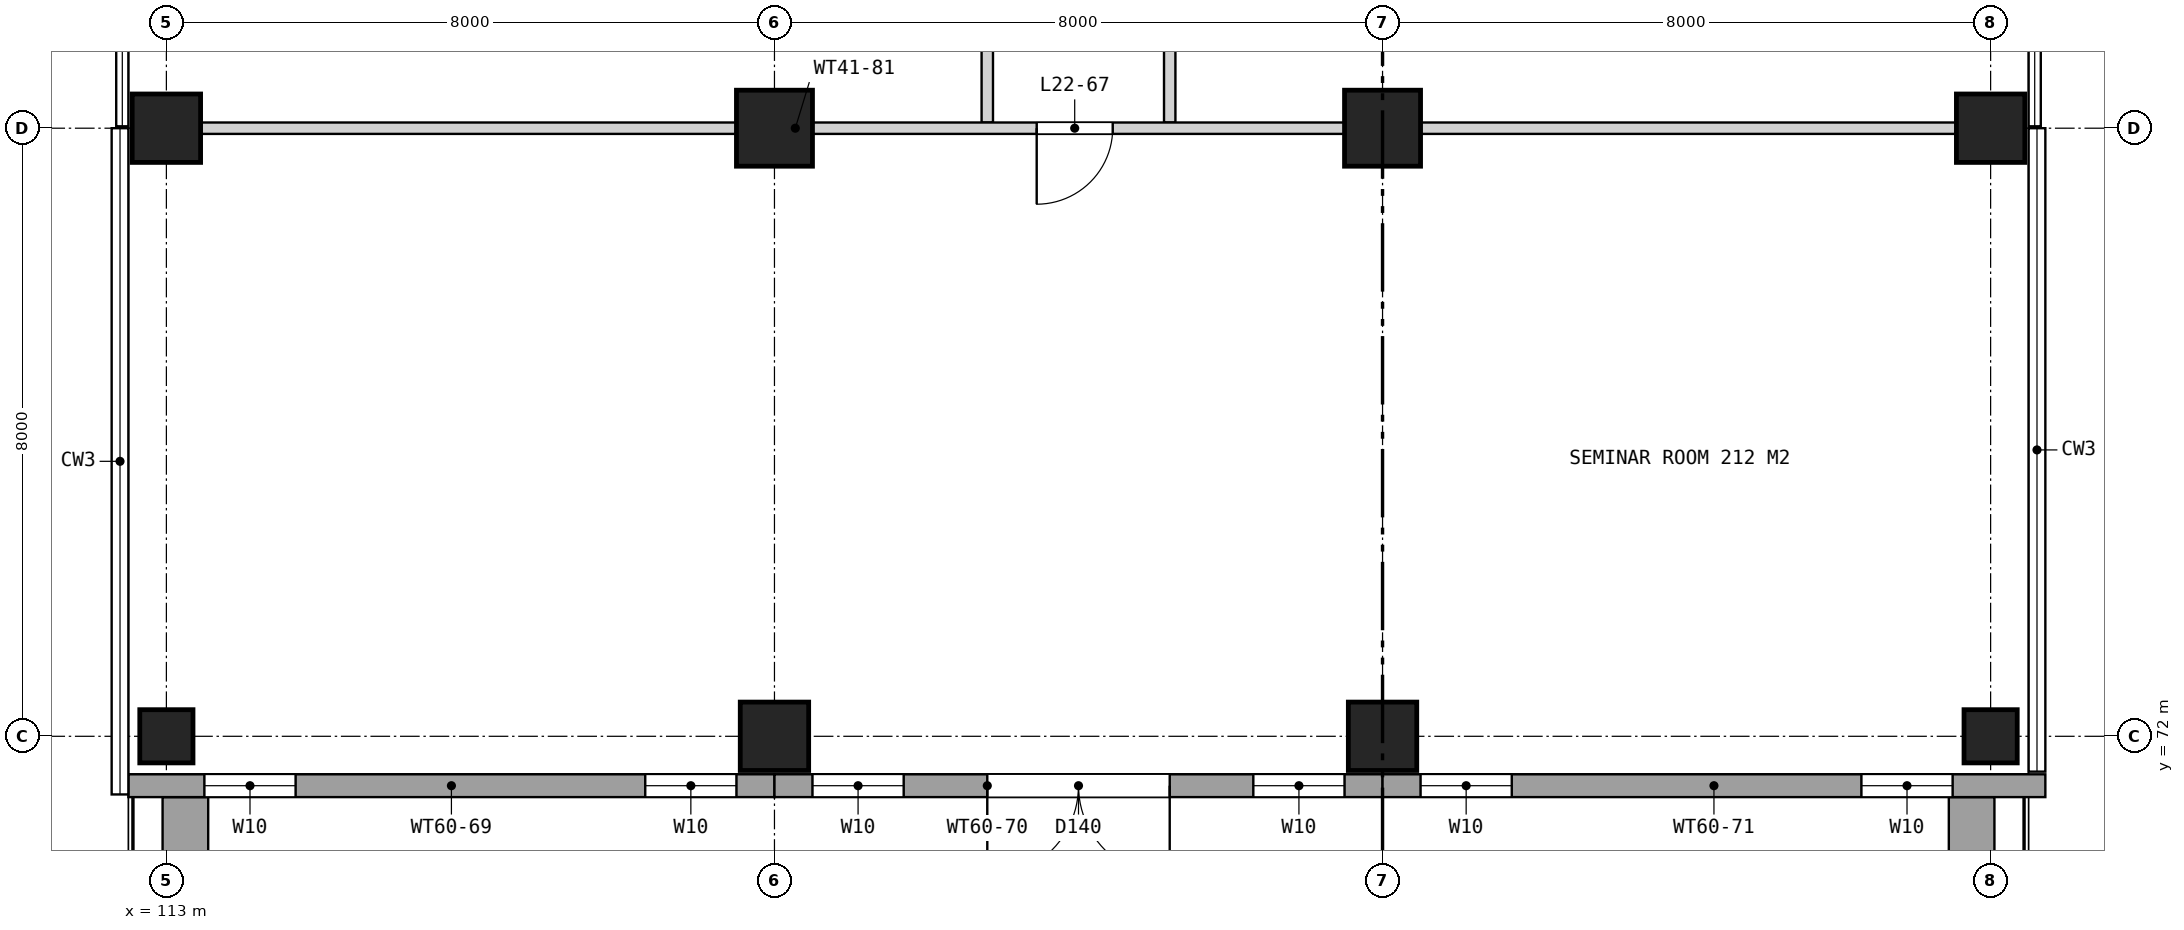
"""IFC4 building model, lengths in metres.
Left out: names, types, materials, properties, quantities, classifications, styles, units other than length and angle.
Written with IfcOpenShell. Run it as: python <this file> out.ifc"""

import sys

from ifc_helpers import new_model, si_unit, direction, frame, frame_2d, origin, origin_2d, place, context, subcontext, project, spatial, rectangle, extrude, element, fill, save


model = new_model("IFC4")
c1 = context("Model", 3, precision=1e-05, world=origin(), true_north=direction((0.0, 1.0)))
c2 = subcontext(c1, "Body", "Model", "MODEL_VIEW")
j1 = project(units=[si_unit("LENGTHUNIT", "METRE"), si_unit("PLANEANGLEUNIT", "RADIAN")], contexts=[c1])
p1 = place(None, origin())
s1 = spatial("IfcSite", under=j1, at=p1, CompositionType="ELEMENT")
p2 = place(p1, origin())
s2 = spatial("IfcBuilding", under=s1, at=p2, CompositionType="ELEMENT")
p3 = place(p2, frame((0.0, 0.0, 112.7)))
s3 = spatial("IfcBuildingStorey", under=s2, at=p3, CompositionType="ELEMENT", Elevation=112.7)
p4 = place(p3, frame((113.0, 72.0, 0.0), z_axis=(0.0, 0.0, 1.0), x_axis=(1.0, 0.0, 0.0)))
e1 = element("IfcColumn", 1, at=p4, inside=s3, PredefinedType="COLUMN", context=c2, shape_type="SweptSolid", body=[
    extrude(rectangle(XDim=0.7, YDim=0.7, at=origin_2d()), origin(), (0.0, 0.0, 1.0), 4.2),
])
for number, where, z_axis, x_axis in (
    (2, (113.0, 80.0, 0.0), (0.0, 0.0, 1.0), (1.0, 0.0, 0.0)),
    (3, (121.0, 72.0, 0.0), (0.0, 0.0, 1.0), (1.0, 0.0, 0.0)),
):
    element("IfcColumn", number, at=place(p3, frame(where, z_axis=z_axis, x_axis=x_axis)), inside=s3, PredefinedType="COLUMN", context=c2, shape_type="SweptSolid", body=[
        extrude(rectangle(XDim=0.9, YDim=0.9, at=origin_2d()), origin(), (0.0, 0.0, 1.0), 4.2),
    ])
p5 = place(p3, frame((121.0, 80.0, 0.0), z_axis=(0.0, 0.0, 1.0), x_axis=(1.0, 0.0, 0.0)))
e4 = element("IfcColumn", 4, at=p5, inside=s3, PredefinedType="COLUMN", context=c2, shape_type="SweptSolid", body=[
    extrude(rectangle(XDim=1.0, YDim=1.0, at=origin_2d()), origin(), (0.0, 0.0, 1.0), 4.2),
])
p6 = place(p3, frame((129.0, 72.0, 0.0), z_axis=(0.0, 0.0, 1.0), x_axis=(1.0, 0.0, 0.0)))
e5 = element("IfcColumn", 5, at=p6, inside=s3, PredefinedType="COLUMN", context=c2, shape_type="SweptSolid", body=[
    extrude(rectangle(XDim=0.9, YDim=0.9, at=origin_2d()), origin(), (0.0, 0.0, 1.0), 4.2),
])
p7 = place(p3, frame((129.0, 80.0, 0.0), z_axis=(0.0, 0.0, 1.0), x_axis=(1.0, 0.0, 0.0)))
e6 = element("IfcColumn", 6, at=p7, inside=s3, PredefinedType="COLUMN", context=c2, shape_type="SweptSolid", body=[
    extrude(rectangle(XDim=1.0, YDim=1.0, at=origin_2d()), origin(), (0.0, 0.0, 1.0), 4.2),
])
p8 = place(p3, frame((137.0, 72.0, 0.0), z_axis=(0.0, 0.0, 1.0), x_axis=(1.0, 0.0, 0.0)))
e7 = element("IfcColumn", 7, at=p8, inside=s3, PredefinedType="COLUMN", context=c2, shape_type="SweptSolid", body=[
    extrude(rectangle(XDim=0.7, YDim=0.7, at=origin_2d()), origin(), (0.0, 0.0, 1.0), 4.2),
])
p9 = place(p3, frame((137.0, 80.0, 0.0), z_axis=(0.0, 0.0, 1.0), x_axis=(1.0, 0.0, 0.0)))
e8 = element("IfcColumn", 8, at=p9, inside=s3, PredefinedType="COLUMN", context=c2, shape_type="SweptSolid", body=[
    extrude(rectangle(XDim=0.9, YDim=0.9, at=origin_2d()), origin(), (0.0, 0.0, 1.0), 4.2),
])
p10 = place(p3, frame((136.75, 71.2, 0.0), z_axis=(0.0, 0.0, 1.0), x_axis=(0.0, -1.0, 0.0)))
e9 = element("IfcWall", 9, at=p10, inside=s3, PredefinedType="SOLIDWALL", context=c2, shape_type="SweptSolid", body=[
    extrude(rectangle(XDim=7.25, YDim=0.6, at=frame_2d((3.625, 0.0))), origin(), (0.0, 0.0, 1.0), 0.6),
])
p11 = place(p3, frame((113.25, 64.55, 0.0), z_axis=(0.0, 0.0, 1.0), x_axis=(0.0, 1.0, 0.0)))
e10 = element("IfcWall", 10, at=p11, inside=s3, PredefinedType="SOLIDWALL", context=c2, shape_type="SweptSolid", body=[
    extrude(rectangle(XDim=6.65, YDim=0.6, at=frame_2d((3.325, 0.0))), origin(), (0.0, 0.0, 1.0), 0.6),
])
p12 = place(p3, frame((112.5, 71.35, 0.0), z_axis=(0.0, 0.0, 1.0), x_axis=(1.0, 0.0, 0.0)))
e11 = element("IfcWall", 11, at=p12, inside=s3, PredefinedType="SOLIDWALL", context=c2, shape_type="SweptSolid", body=[
    extrude(rectangle(XDim=8.5, YDim=0.3, at=frame_2d((4.25, 0.0))), origin(), (0.0, 0.0, 1.0), 3.447),
])
p13 = place(p12, frame((1.0, 0.0, 0.4)))
e12 = element("IfcOpeningElement", 12, at=p13, cuts=e11, PredefinedType="OPENING", context=c2, shape_type="SweptSolid", body=[
    extrude(rectangle(XDim=1.2, YDim=2.2, at=frame_2d((0.6, 1.1))), frame((0.0, 0.16, 0.0), z_axis=(0.0, -1.0, 0.0), x_axis=(1.0, 0.0, 0.0)), (0.0, 0.0, 1.0), 0.32),
])
p14 = place(p12, frame((6.8, 0.0, 0.4)))
e13 = element("IfcOpeningElement", 13, at=p14, cuts=e11, PredefinedType="OPENING", context=c2, shape_type="SweptSolid", body=[
    extrude(rectangle(XDim=1.2, YDim=2.2, at=frame_2d((0.6, 1.1))), frame((0.0, 0.16, 0.0), z_axis=(0.0, -1.0, 0.0), x_axis=(1.0, 0.0, 0.0)), (0.0, 0.0, 1.0), 0.32),
])
p15 = place(p3, frame((121.0, 71.35, 0.0), z_axis=(0.0, 0.0, 1.0), x_axis=(1.0, 0.0, 0.0)))
e14 = element("IfcWall", 14, at=p15, inside=s3, PredefinedType="SOLIDWALL", context=c2, shape_type="SweptSolid", body=[
    extrude(rectangle(XDim=8.0, YDim=0.3, at=frame_2d((4.0, 0.0))), origin(), (0.0, 0.0, 1.0), 3.447),
])
p16 = place(p15, frame((2.8, 0.0, 0.0)))
e15 = element("IfcOpeningElement", 15, at=p16, cuts=e14, PredefinedType="OPENING", context=c2, shape_type="SweptSolid", body=[
    extrude(rectangle(XDim=2.4, YDim=2.4, at=frame_2d((1.2, 1.2))), frame((0.0, 0.16, 0.0), z_axis=(0.0, -1.0, 0.0), x_axis=(1.0, 0.0, 0.0)), (0.0, 0.0, 1.0), 0.32),
])
p17 = place(p15, frame((0.5, 0.0, 0.4)))
e16 = element("IfcOpeningElement", 16, at=p17, cuts=e14, PredefinedType="OPENING", context=c2, shape_type="SweptSolid", body=[
    extrude(rectangle(XDim=1.2, YDim=2.2, at=frame_2d((0.6, 1.1))), frame((0.0, 0.16, 0.0), z_axis=(0.0, -1.0, 0.0), x_axis=(1.0, 0.0, 0.0)), (0.0, 0.0, 1.0), 0.32),
])
p18 = place(p15, frame((6.3, 0.0, 0.4)))
e17 = element("IfcOpeningElement", 17, at=p18, cuts=e14, PredefinedType="OPENING", context=c2, shape_type="SweptSolid", body=[
    extrude(rectangle(XDim=1.2, YDim=2.2, at=frame_2d((0.6, 1.1))), frame((0.0, 0.16, 0.0), z_axis=(0.0, -1.0, 0.0), x_axis=(1.0, 0.0, 0.0)), (0.0, 0.0, 1.0), 0.32),
])
p19 = place(p3, frame((129.0, 71.35, 0.0), z_axis=(0.0, 0.0, 1.0), x_axis=(1.0, 0.0, 0.0)))
e18 = element("IfcWall", 18, at=p19, inside=s3, PredefinedType="SOLIDWALL", context=c2, shape_type="SweptSolid", body=[
    extrude(rectangle(XDim=8.72, YDim=0.3, at=frame_2d((4.36, 0.0))), origin(), (0.0, 0.0, 1.0), 3.447),
])
p20 = place(p19, frame((0.5, 0.0, 0.4)))
e19 = element("IfcOpeningElement", 19, at=p20, cuts=e18, PredefinedType="OPENING", context=c2, shape_type="SweptSolid", body=[
    extrude(rectangle(XDim=1.2, YDim=2.2, at=frame_2d((0.6, 1.1))), frame((0.0, 0.16, 0.0), z_axis=(0.0, -1.0, 0.0), x_axis=(1.0, 0.0, 0.0)), (0.0, 0.0, 1.0), 0.32),
])
p21 = place(p19, frame((6.3, 0.0, 0.4)))
e20 = element("IfcOpeningElement", 20, at=p21, cuts=e18, PredefinedType="OPENING", context=c2, shape_type="SweptSolid", body=[
    extrude(rectangle(XDim=1.2, YDim=2.2, at=frame_2d((0.6, 1.1))), frame((0.0, 0.16, 0.0), z_axis=(0.0, -1.0, 0.0), x_axis=(1.0, 0.0, 0.0)), (0.0, 0.0, 1.0), 0.32),
])
p22 = place(p3, frame((123.8, 80.075, 0.0), z_axis=(0.0, 0.0, 1.0), x_axis=(0.0, 1.0, 0.0)))
e21 = element("IfcWall", 21, at=p22, inside=s3, PredefinedType="PARTITIONING", context=c2, shape_type="SweptSolid", body=[
    extrude(rectangle(XDim=18.725, YDim=0.15, at=frame_2d((9.363, 0.0))), origin(), (0.0, 0.0, 1.0), 3.437),
])
p23 = place(p22, frame((16.975, 0.0, 0.0)))
e22 = element("IfcOpeningElement", 22, at=p23, cuts=e21, PredefinedType="OPENING", context=c2, shape_type="SweptSolid", body=[
    extrude(rectangle(XDim=1.0, YDim=2.1, at=frame_2d((0.5, 1.05))), frame((0.0, 0.085, 0.0), z_axis=(0.0, -1.0, 0.0), x_axis=(1.0, 0.0, 0.0)), (0.0, 0.0, 1.0), 0.17),
])
p24 = place(p22, frame((14.575, 0.0, 0.0)))
e23 = element("IfcOpeningElement", 23, at=p24, cuts=e21, PredefinedType="OPENING", context=c2, shape_type="SweptSolid", body=[
    extrude(rectangle(XDim=1.0, YDim=2.1, at=frame_2d((0.5, 1.05))), frame((0.0, 0.085, 0.0), z_axis=(0.0, -1.0, 0.0), x_axis=(1.0, 0.0, 0.0)), (0.0, 0.0, 1.0), 0.17),
])
p25 = place(p22, frame((10.375, 0.0, 0.0)))
e24 = element("IfcOpeningElement", 24, at=p25, cuts=e21, PredefinedType="OPENING", context=c2, shape_type="SweptSolid", body=[
    extrude(rectangle(XDim=1.0, YDim=2.1, at=frame_2d((0.5, 1.05))), frame((0.0, 0.085, 0.0), z_axis=(0.0, -1.0, 0.0), x_axis=(1.0, 0.0, 0.0)), (0.0, 0.0, 1.0), 0.17),
])
p26 = place(p22, frame((3.45, 0.0, 0.0)))
e25 = element("IfcOpeningElement", 25, at=p26, cuts=e21, PredefinedType="OPENING", context=c2, shape_type="SweptSolid", body=[
    extrude(rectangle(XDim=1.0, YDim=2.1, at=frame_2d((0.5, 1.05))), frame((0.0, 0.085, 0.0), z_axis=(0.0, -1.0, 0.0), x_axis=(1.0, 0.0, 0.0)), (0.0, 0.0, 1.0), 0.17),
])
p27 = place(p3, frame((126.2, 80.075, 0.0), z_axis=(0.0, 0.0, 1.0), x_axis=(0.0, 1.0, 0.0)))
e26 = element("IfcWall", 26, at=p27, inside=s3, PredefinedType="PARTITIONING", context=c2, shape_type="SweptSolid", body=[
    extrude(rectangle(XDim=18.725, YDim=0.15, at=frame_2d((9.363, 0.0))), origin(), (0.0, 0.0, 1.0), 3.437),
])
p28 = place(p27, frame((16.975, 0.0, 0.0)))
e27 = element("IfcOpeningElement", 27, at=p28, cuts=e26, PredefinedType="OPENING", context=c2, shape_type="SweptSolid", body=[
    extrude(rectangle(XDim=1.0, YDim=2.1, at=frame_2d((0.5, 1.05))), frame((0.0, 0.085, 0.0), z_axis=(0.0, -1.0, 0.0), x_axis=(1.0, 0.0, 0.0)), (0.0, 0.0, 1.0), 0.17),
])
p29 = place(p27, frame((14.575, 0.0, 0.0)))
e28 = element("IfcOpeningElement", 28, at=p29, cuts=e26, PredefinedType="OPENING", context=c2, shape_type="SweptSolid", body=[
    extrude(rectangle(XDim=1.0, YDim=2.1, at=frame_2d((0.5, 1.05))), frame((0.0, 0.085, 0.0), z_axis=(0.0, -1.0, 0.0), x_axis=(1.0, 0.0, 0.0)), (0.0, 0.0, 1.0), 0.17),
])
p30 = place(p27, frame((10.375, 0.0, 0.0)))
e29 = element("IfcOpeningElement", 29, at=p30, cuts=e26, PredefinedType="OPENING", context=c2, shape_type="SweptSolid", body=[
    extrude(rectangle(XDim=1.0, YDim=2.1, at=frame_2d((0.5, 1.05))), frame((0.0, 0.085, 0.0), z_axis=(0.0, -1.0, 0.0), x_axis=(1.0, 0.0, 0.0)), (0.0, 0.0, 1.0), 0.17),
])
p31 = place(p27, frame((3.45, 0.0, 0.0)))
e30 = element("IfcOpeningElement", 30, at=p31, cuts=e26, PredefinedType="OPENING", context=c2, shape_type="SweptSolid", body=[
    extrude(rectangle(XDim=1.0, YDim=2.1, at=frame_2d((0.5, 1.05))), frame((0.0, 0.085, 0.0), z_axis=(0.0, -1.0, 0.0), x_axis=(1.0, 0.0, 0.0)), (0.0, 0.0, 1.0), 0.17),
])
p32 = place(p3, frame((112.58, 80.0, 0.0), z_axis=(0.0, 0.0, 1.0), x_axis=(1.0, 0.0, 0.0)))
e31 = element("IfcWall", 31, at=p32, inside=s3, PredefinedType="PARTITIONING", context=c2, shape_type="SweptSolid", body=[
    extrude(rectangle(XDim=24.84, YDim=0.15, at=frame_2d((12.42, 0.0))), origin(), (0.0, 0.0, 1.0), 3.437),
])
p33 = place(p32, frame((11.87, 0.0, 0.0)))
e32 = element("IfcOpeningElement", 32, at=p33, cuts=e31, PredefinedType="OPENING", context=c2, shape_type="SweptSolid", body=[
    extrude(rectangle(XDim=1.0, YDim=2.1, at=frame_2d((0.5, 1.05))), frame((0.0, 0.085, 0.0), z_axis=(0.0, -1.0, 0.0), x_axis=(1.0, 0.0, 0.0)), (0.0, 0.0, 1.0), 0.17),
])
p34 = place(p13, origin())
e33 = element("IfcWindow", 33, at=p34, inside=s3, PartitioningType="SINGLE_PANEL", PredefinedType="WINDOW", context=c2, shape_type="SweptSolid", body=[
    extrude(rectangle(XDim=1.2, YDim=2.2, at=frame_2d((0.6, 1.1))), frame((0.0, 0.03, 0.0), z_axis=(0.0, -1.0, 0.0), x_axis=(1.0, 0.0, 0.0)), (0.0, 0.0, 1.0), 0.06),
])
fill(e12, e33)
p35 = place(p14, origin())
e34 = element("IfcWindow", 34, at=p35, inside=s3, PartitioningType="SINGLE_PANEL", PredefinedType="WINDOW", context=c2, shape_type="SweptSolid", body=[
    extrude(rectangle(XDim=1.2, YDim=2.2, at=frame_2d((0.6, 1.1))), frame((0.0, 0.03, 0.0), z_axis=(0.0, -1.0, 0.0), x_axis=(1.0, 0.0, 0.0)), (0.0, 0.0, 1.0), 0.06),
])
fill(e13, e34)
p36 = place(p16, frame((2.4, 0.0, 0.0), z_axis=(0.0, 0.0, 1.0), x_axis=(-1.0, 0.0, 0.0)))
e35 = element("IfcDoor", 35, at=p36, inside=s3, OperationType="DOUBLE_DOOR_SINGLE_SWING", PredefinedType="DOOR", context=c2, shape_type="SweptSolid", body=[
    extrude(rectangle(XDim=2.4, YDim=2.4, at=frame_2d((1.2, 1.2))), frame((0.0, 0.025, 0.0), z_axis=(0.0, -1.0, 0.0), x_axis=(1.0, 0.0, 0.0)), (0.0, 0.0, 1.0), 0.05),
])
fill(e15, e35)
p37 = place(p17, origin())
e36 = element("IfcWindow", 36, at=p37, inside=s3, PartitioningType="SINGLE_PANEL", PredefinedType="WINDOW", context=c2, shape_type="SweptSolid", body=[
    extrude(rectangle(XDim=1.2, YDim=2.2, at=frame_2d((0.6, 1.1))), frame((0.0, 0.03, 0.0), z_axis=(0.0, -1.0, 0.0), x_axis=(1.0, 0.0, 0.0)), (0.0, 0.0, 1.0), 0.06),
])
fill(e16, e36)
p38 = place(p18, origin())
e37 = element("IfcWindow", 37, at=p38, inside=s3, PartitioningType="SINGLE_PANEL", PredefinedType="WINDOW", context=c2, shape_type="SweptSolid", body=[
    extrude(rectangle(XDim=1.2, YDim=2.2, at=frame_2d((0.6, 1.1))), frame((0.0, 0.03, 0.0), z_axis=(0.0, -1.0, 0.0), x_axis=(1.0, 0.0, 0.0)), (0.0, 0.0, 1.0), 0.06),
])
fill(e17, e37)
p39 = place(p20, origin())
e38 = element("IfcWindow", 38, at=p39, inside=s3, PartitioningType="SINGLE_PANEL", PredefinedType="WINDOW", context=c2, shape_type="SweptSolid", body=[
    extrude(rectangle(XDim=1.2, YDim=2.2, at=frame_2d((0.6, 1.1))), frame((0.0, 0.03, 0.0), z_axis=(0.0, -1.0, 0.0), x_axis=(1.0, 0.0, 0.0)), (0.0, 0.0, 1.0), 0.06),
])
fill(e19, e38)
p40 = place(p21, origin())
e39 = element("IfcWindow", 39, at=p40, inside=s3, PartitioningType="SINGLE_PANEL", PredefinedType="WINDOW", context=c2, shape_type="SweptSolid", body=[
    extrude(rectangle(XDim=1.2, YDim=2.2, at=frame_2d((0.6, 1.1))), frame((0.0, 0.03, 0.0), z_axis=(0.0, -1.0, 0.0), x_axis=(1.0, 0.0, 0.0)), (0.0, 0.0, 1.0), 0.06),
])
fill(e20, e39)
p41 = place(p33, frame((1.0, 0.0, 0.0), z_axis=(0.0, 0.0, 1.0), x_axis=(-1.0, 0.0, 0.0)))
e40 = element("IfcDoor", 40, at=p41, inside=s3, OperationType="SINGLE_SWING_RIGHT", PredefinedType="DOOR", context=c2, shape_type="SweptSolid", body=[
    extrude(rectangle(XDim=1.0, YDim=2.1, at=frame_2d((0.5, 1.05))), frame((0.0, 0.025, 0.0), z_axis=(0.0, -1.0, 0.0), x_axis=(1.0, 0.0, 0.0)), (0.0, 0.0, 1.0), 0.05),
])
fill(e32, e40)
save(model, sys.argv[1])
